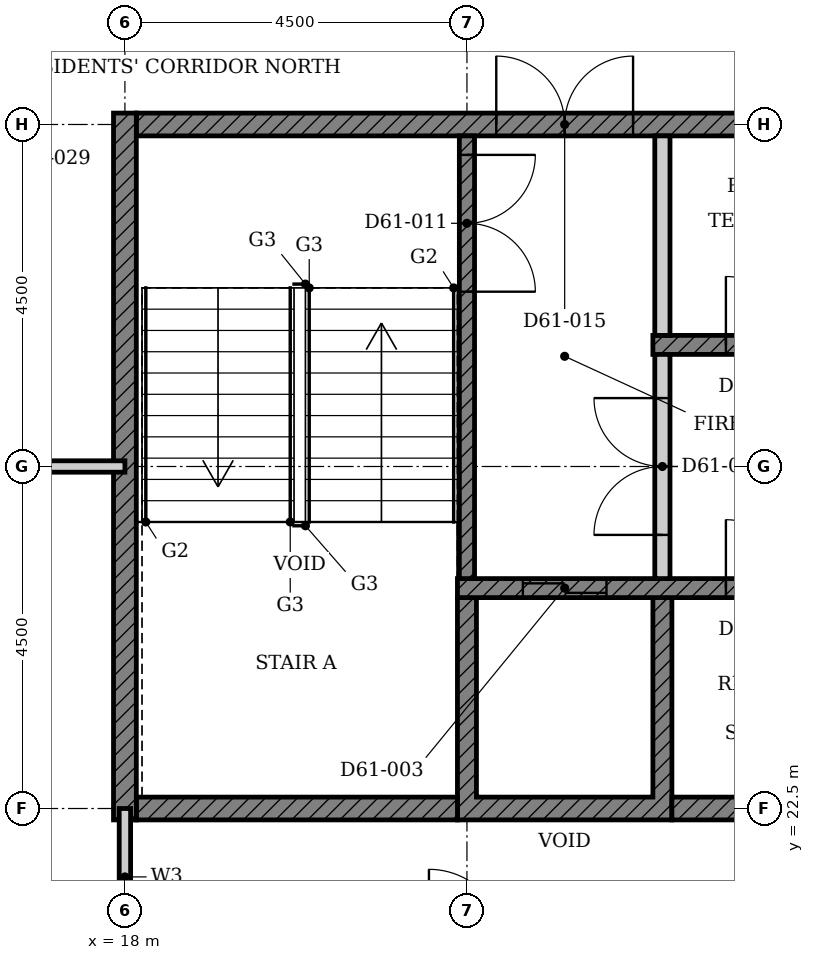
"""IFC4 building model, lengths in metres.
Left out: names, types, materials, properties, quantities, classifications, styles, units other than length and angle.
Written with IfcOpenShell. Run it as: python <this file> out.ifc"""

import sys

from ifc_helpers import new_model, si_unit, direction, frame, frame_2d, origin, place, context, subcontext, project, spatial, polyline, rectangle, outline, extrude, element, fill, save


model = new_model("IFC4")
c1 = context("Model", 3, precision=1e-05, world=origin(), true_north=direction((0.0, 1.0)))
c2 = subcontext(c1, "Body", "Model", "MODEL_VIEW")
j1 = project(units=[si_unit("LENGTHUNIT", "METRE"), si_unit("PLANEANGLEUNIT", "RADIAN")], contexts=[c1])
p1 = place(None, origin())
s1 = spatial("IfcSite", under=j1, at=p1, CompositionType="ELEMENT")
p2 = place(p1, origin())
s2 = spatial("IfcBuilding", under=s1, at=p2, CompositionType="ELEMENT")
p3 = place(p2, frame((0.0, 0.0, 241.6)))
s3 = spatial("IfcBuildingStorey", under=s2, at=p3, CompositionType="ELEMENT", Elevation=241.6)
p4 = place(p3, origin())
e1 = element("IfcWall", 1, at=p4, inside=s3, PredefinedType="SHEAR", context=c2, shape_type="SweptSolid", body=[
    extrude(outline(polyline([(22.375, 22.35), (25.197, 22.35), (25.197, 25.275), (24.947, 25.275), (24.947, 22.65), (22.625, 22.65), (22.625, 25.275), (22.375, 25.275), (22.375, 22.35)])), origin(), (0.0, 0.0, 1.0), 3.4),
])
p5 = place(p3, frame((18.15, 22.5, 0.0), z_axis=(0.0, 0.0, 1.0), x_axis=(1.0, 0.0, 0.0)))
e2 = element("IfcWall", 2, at=p5, inside=s3, PredefinedType="SHEAR", context=c2, shape_type="SweptSolid", body=[
    extrude(rectangle(XDim=4.225, YDim=0.3, at=frame_2d((2.113, 0.0))), origin(), (0.0, 0.0, 1.0), 3.4),
])
p6 = place(p3, frame((25.197, 22.5, 0.0), z_axis=(0.0, 0.0, 1.0), x_axis=(1.0, 0.0, 0.0)))
e3 = element("IfcWall", 3, at=p6, inside=s3, PredefinedType="SHEAR", context=c2, shape_type="SweptSolid", body=[
    extrude(rectangle(XDim=2.321, YDim=0.3, at=frame_2d((1.161, 0.0))), origin(), (0.0, 0.0, 1.0), 3.4),
])
p7 = place(p3, frame((18.15, 31.5, 0.0), z_axis=(0.0, 0.0, 1.0), x_axis=(1.0, 0.0, 0.0)))
e4 = element("IfcWall", 4, at=p7, inside=s3, PredefinedType="SHEAR", context=c2, shape_type="SweptSolid", body=[
    extrude(rectangle(XDim=9.368, YDim=0.3, at=frame_2d((4.684, 0.0))), origin(), (0.0, 0.0, 1.0), 3.4),
])
p8 = place(p7, frame((4.736, 0.0, 0.0)))
e5 = element("IfcOpeningElement", 5, at=p8, cuts=e4, PredefinedType="OPENING", context=c2, shape_type="SweptSolid", body=[
    extrude(rectangle(XDim=1.8, YDim=2.1, at=frame_2d((0.9, 1.05))), frame((0.0, 0.16, 0.0), z_axis=(0.0, -1.0, 0.0), x_axis=(1.0, 0.0, 0.0)), (0.0, 0.0, 1.0), 0.32),
])
p9 = place(p3, frame((18.0, 22.35, 0.0), z_axis=(0.0, 0.0, 1.0), x_axis=(0.0, 1.0, 0.0)))
e6 = element("IfcWall", 6, at=p9, inside=s3, PredefinedType="SHEAR", context=c2, shape_type="SweptSolid", body=[
    extrude(rectangle(XDim=9.3, YDim=0.3, at=frame_2d((4.65, 0.0))), origin(), (0.0, 0.0, 1.0), 3.4),
])
p10 = place(p3, frame((22.375, 25.4, 0.0), z_axis=(0.0, 0.0, 1.0), x_axis=(1.0, 0.0, 0.0)))
e7 = element("IfcWall", 7, at=p10, inside=s3, PredefinedType="SHEAR", context=c2, shape_type="SweptSolid", body=[
    extrude(rectangle(XDim=15.678, YDim=0.25, at=frame_2d((7.839, 0.0))), origin(), (0.0, 0.0, 1.0), 3.4),
])
p11 = place(p10, frame((6.004, 0.0, 0.0)))
e8 = element("IfcOpeningElement", 8, at=p11, cuts=e7, PredefinedType="OPENING", context=c2, shape_type="SweptSolid", body=[
    extrude(rectangle(XDim=1.1, YDim=2.1, at=frame_2d((0.55, 1.05))), frame((0.0, 0.135, 0.0), z_axis=(0.0, -1.0, 0.0), x_axis=(1.0, 0.0, 0.0)), (0.0, 0.0, 1.0), 0.27),
])
p12 = place(p10, frame((0.861, 0.0, 0.0)))
e9 = element("IfcOpeningElement", 9, at=p12, cuts=e7, PredefinedType="OPENING", context=c2, shape_type="SweptSolid", body=[
    extrude(rectangle(XDim=1.1, YDim=2.1, at=frame_2d((0.55, 1.05))), frame((0.0, 0.135, 0.0), z_axis=(0.0, -1.0, 0.0), x_axis=(1.0, 0.0, 0.0)), (0.0, 0.0, 1.0), 0.27),
])
p13 = place(p10, frame((3.532, 0.0, 0.0)))
e10 = element("IfcOpeningElement", 10, at=p13, cuts=e7, PredefinedType="OPENING", context=c2, shape_type="SweptSolid", body=[
    extrude(rectangle(XDim=0.9, YDim=2.1, at=frame_2d((0.45, 1.05))), frame((0.0, 0.135, 0.0), z_axis=(0.0, -1.0, 0.0), x_axis=(1.0, 0.0, 0.0)), (0.0, 0.0, 1.0), 0.27),
])
p14 = place(p10, frame((8.675, 0.0, 0.0)))
e11 = element("IfcOpeningElement", 11, at=p14, cuts=e7, PredefinedType="OPENING", context=c2, shape_type="SweptSolid", body=[
    extrude(rectangle(XDim=0.9, YDim=2.1, at=frame_2d((0.45, 1.05))), frame((0.0, 0.135, 0.0), z_axis=(0.0, -1.0, 0.0), x_axis=(1.0, 0.0, 0.0)), (0.0, 0.0, 1.0), 0.27),
])
p15 = place(p10, frame((12.532, 0.0, 0.0)))
e12 = element("IfcOpeningElement", 12, at=p15, cuts=e7, PredefinedType="OPENING", context=c2, shape_type="SweptSolid", body=[
    extrude(rectangle(XDim=0.9, YDim=2.1, at=frame_2d((0.45, 1.05))), frame((0.0, 0.135, 0.0), z_axis=(0.0, -1.0, 0.0), x_axis=(1.0, 0.0, 0.0)), (0.0, 0.0, 1.0), 0.27),
])
p16 = place(p3, frame((24.947, 28.6, 0.0), z_axis=(0.0, 0.0, 1.0), x_axis=(1.0, 0.0, 0.0)))
e13 = element("IfcWall", 13, at=p16, inside=s3, PredefinedType="SHEAR", context=c2, shape_type="SweptSolid", body=[
    extrude(rectangle(XDim=15.678, YDim=0.25, at=frame_2d((7.839, 0.0))), origin(), (0.0, 0.0, 1.0), 3.4),
])
p17 = place(p16, frame((3.432, 0.0, 0.0)))
e14 = element("IfcOpeningElement", 14, at=p17, cuts=e13, PredefinedType="OPENING", context=c2, shape_type="SweptSolid", body=[
    extrude(rectangle(XDim=1.1, YDim=2.1, at=frame_2d((0.55, 1.05))), frame((0.0, 0.135, 0.0), z_axis=(0.0, -1.0, 0.0), x_axis=(1.0, 0.0, 0.0)), (0.0, 0.0, 1.0), 0.27),
])
p18 = place(p16, frame((13.718, 0.0, 0.0)))
e15 = element("IfcOpeningElement", 15, at=p18, cuts=e13, PredefinedType="OPENING", context=c2, shape_type="SweptSolid", body=[
    extrude(rectangle(XDim=1.1, YDim=2.1, at=frame_2d((0.55, 1.05))), frame((0.0, 0.135, 0.0), z_axis=(0.0, -1.0, 0.0), x_axis=(1.0, 0.0, 0.0)), (0.0, 0.0, 1.0), 0.27),
])
p19 = place(p16, frame((0.961, 0.0, 0.0)))
e16 = element("IfcOpeningElement", 16, at=p19, cuts=e13, PredefinedType="OPENING", context=c2, shape_type="SweptSolid", body=[
    extrude(rectangle(XDim=0.9, YDim=2.1, at=frame_2d((0.45, 1.05))), frame((0.0, 0.135, 0.0), z_axis=(0.0, -1.0, 0.0), x_axis=(1.0, 0.0, 0.0)), (0.0, 0.0, 1.0), 0.27),
])
p20 = place(p16, frame((7.389, 0.0, 0.0)))
e17 = element("IfcOpeningElement", 17, at=p20, cuts=e13, PredefinedType="OPENING", context=c2, shape_type="SweptSolid", body=[
    extrude(rectangle(XDim=0.9, YDim=2.1, at=frame_2d((0.45, 1.05))), frame((0.0, 0.135, 0.0), z_axis=(0.0, -1.0, 0.0), x_axis=(1.0, 0.0, 0.0)), (0.0, 0.0, 1.0), 0.27),
])
p21 = place(p16, frame((11.246, 0.0, 0.0)))
e18 = element("IfcOpeningElement", 18, at=p21, cuts=e13, PredefinedType="OPENING", context=c2, shape_type="SweptSolid", body=[
    extrude(rectangle(XDim=0.9, YDim=2.1, at=frame_2d((0.45, 1.05))), frame((0.0, 0.135, 0.0), z_axis=(0.0, -1.0, 0.0), x_axis=(1.0, 0.0, 0.0)), (0.0, 0.0, 1.0), 0.27),
])
p22 = place(p3, frame((25.072, 28.725, 0.0), z_axis=(0.0, 0.0, 1.0), x_axis=(0.0, 1.0, 0.0)))
e19 = element("IfcWall", 19, at=p22, inside=s3, PredefinedType="PARTITIONING", context=c2, shape_type="SweptSolid", body=[
    extrude(rectangle(XDim=2.625, YDim=0.2, at=frame_2d((1.312, 0.0))), origin(), (0.0, 0.0, 1.0), 3.4),
])
p23 = place(p3, frame((22.5, 31.35, 0.0), z_axis=(0.0, 0.0, 1.0), x_axis=(0.0, -1.0, 0.0)))
e20 = element("IfcWall", 20, at=p23, inside=s3, PredefinedType="SHEAR", context=c2, shape_type="SweptSolid", body=[
    extrude(rectangle(XDim=5.825, YDim=0.2, at=frame_2d((2.913, 0.0))), origin(), (0.0, 0.0, 1.0), 3.4),
])
p24 = place(p23, frame((0.25, 0.0, 0.0)))
e21 = element("IfcOpeningElement", 21, at=p24, cuts=e20, PredefinedType="OPENING", context=c2, shape_type="SweptSolid", body=[
    extrude(rectangle(XDim=1.8, YDim=2.1, at=frame_2d((0.9, 1.05))), frame((0.0, 0.11, 0.0), z_axis=(0.0, -1.0, 0.0), x_axis=(1.0, 0.0, 0.0)), (0.0, 0.0, 1.0), 0.22),
])
p25 = place(p3, frame((25.072, 25.525, 0.0), z_axis=(0.0, 0.0, 1.0), x_axis=(0.0, 1.0, 0.0)))
e22 = element("IfcWall", 22, at=p25, inside=s3, PredefinedType="PARTITIONING", context=c2, shape_type="SweptSolid", body=[
    extrude(rectangle(XDim=2.95, YDim=0.2, at=frame_2d((1.475, 0.0))), origin(), (0.0, 0.0, 1.0), 3.4),
])
p26 = place(p25, frame((0.575, 0.0, 0.0)))
e23 = element("IfcOpeningElement", 23, at=p26, cuts=e22, PredefinedType="OPENING", context=c2, shape_type="SweptSolid", body=[
    extrude(rectangle(XDim=1.8, YDim=2.1, at=frame_2d((0.9, 1.05))), frame((0.0, 0.11, 0.0), z_axis=(0.0, -1.0, 0.0), x_axis=(1.0, 0.0, 0.0)), (0.0, 0.0, 1.0), 0.22),
])
p27 = place(p3, frame((4.5, 27.0, 0.0), z_axis=(0.0, 0.0, 1.0), x_axis=(1.0, 0.0, 0.0)))
e24 = element("IfcWall", 24, at=p27, inside=s3, PredefinedType="PARTITIONING", context=c2, shape_type="SweptSolid", body=[
    extrude(rectangle(XDim=13.5, YDim=0.15, at=frame_2d((6.75, 0.0))), origin(), (0.0, 0.0, 1.0), 2.68),
])
p28 = place(p27, frame((5.35, 0.0, 0.0)))
e25 = element("IfcOpeningElement", 25, at=p28, cuts=e24, PredefinedType="OPENING", context=c2, shape_type="SweptSolid", body=[
    extrude(rectangle(XDim=1.0, YDim=2.1, at=frame_2d((0.5, 1.05))), frame((0.0, 0.085, 0.0), z_axis=(0.0, -1.0, 0.0), x_axis=(1.0, 0.0, 0.0)), (0.0, 0.0, 1.0), 0.17),
])
p29 = place(p3, frame((18.0, 20.7, 0.0), z_axis=(0.0, 0.0, 1.0), x_axis=(0.0, 1.0, 0.0)))
e26 = element("IfcWall", 26, at=p29, inside=s3, PredefinedType="PARTITIONING", context=c2, shape_type="SweptSolid", body=[
    extrude(rectangle(XDim=1.8, YDim=0.15, at=frame_2d((0.9, 0.0))), origin(), (0.0, 0.0, 1.0), 3.4),
])
p30 = place(p12, origin())
e27 = element("IfcDoor", 27, at=p30, inside=s3, OperationType="DOUBLE_DOOR_SLIDING", PredefinedType="DOOR", context=c2, shape_type="SweptSolid", body=[
    extrude(rectangle(XDim=1.1, YDim=2.1, at=frame_2d((0.55, 1.05))), frame((0.0, 0.025, 0.0), z_axis=(0.0, -1.0, 0.0), x_axis=(1.0, 0.0, 0.0)), (0.0, 0.0, 1.0), 0.05),
])
fill(e9, e27)
p31 = place(p13, origin())
e28 = element("IfcDoor", 28, at=p31, inside=s3, OperationType="SINGLE_SWING_LEFT", PredefinedType="DOOR", context=c2, shape_type="SweptSolid", body=[
    extrude(rectangle(XDim=0.9, YDim=2.1, at=frame_2d((0.45, 1.05))), frame((0.0, 0.025, 0.0), z_axis=(0.0, -1.0, 0.0), x_axis=(1.0, 0.0, 0.0)), (0.0, 0.0, 1.0), 0.05),
])
fill(e10, e28)
p32 = place(p19, origin())
e29 = element("IfcDoor", 29, at=p32, inside=s3, OperationType="SINGLE_SWING_LEFT", PredefinedType="DOOR", context=c2, shape_type="SweptSolid", body=[
    extrude(rectangle(XDim=0.9, YDim=2.1, at=frame_2d((0.45, 1.05))), frame((0.0, 0.025, 0.0), z_axis=(0.0, -1.0, 0.0), x_axis=(1.0, 0.0, 0.0)), (0.0, 0.0, 1.0), 0.05),
])
fill(e16, e29)
p33 = place(p24, origin())
e30 = element("IfcDoor", 30, at=p33, inside=s3, OperationType="DOUBLE_DOOR_SINGLE_SWING", PredefinedType="DOOR", context=c2, shape_type="SweptSolid", body=[
    extrude(rectangle(XDim=1.8, YDim=2.1, at=frame_2d((0.9, 1.05))), frame((0.0, 0.025, 0.0), z_axis=(0.0, -1.0, 0.0), x_axis=(1.0, 0.0, 0.0)), (0.0, 0.0, 1.0), 0.05),
])
fill(e21, e30)
p34 = place(p26, origin())
e31 = element("IfcDoor", 31, at=p34, inside=s3, OperationType="DOUBLE_DOOR_SINGLE_SWING", PredefinedType="DOOR", context=c2, shape_type="SweptSolid", body=[
    extrude(rectangle(XDim=1.8, YDim=2.1, at=frame_2d((0.9, 1.05))), frame((0.0, 0.025, 0.0), z_axis=(0.0, -1.0, 0.0), x_axis=(1.0, 0.0, 0.0)), (0.0, 0.0, 1.0), 0.05),
])
fill(e23, e31)
p35 = place(p8, origin())
e32 = element("IfcDoor", 32, at=p35, inside=s3, OperationType="DOUBLE_DOOR_SINGLE_SWING", PredefinedType="DOOR", context=c2, shape_type="SweptSolid", body=[
    extrude(rectangle(XDim=1.8, YDim=2.1, at=frame_2d((0.9, 1.05))), frame((0.0, 0.025, 0.0), z_axis=(0.0, -1.0, 0.0), x_axis=(1.0, 0.0, 0.0)), (0.0, 0.0, 1.0), 0.05),
])
fill(e5, e32)
save(model, sys.argv[1])
